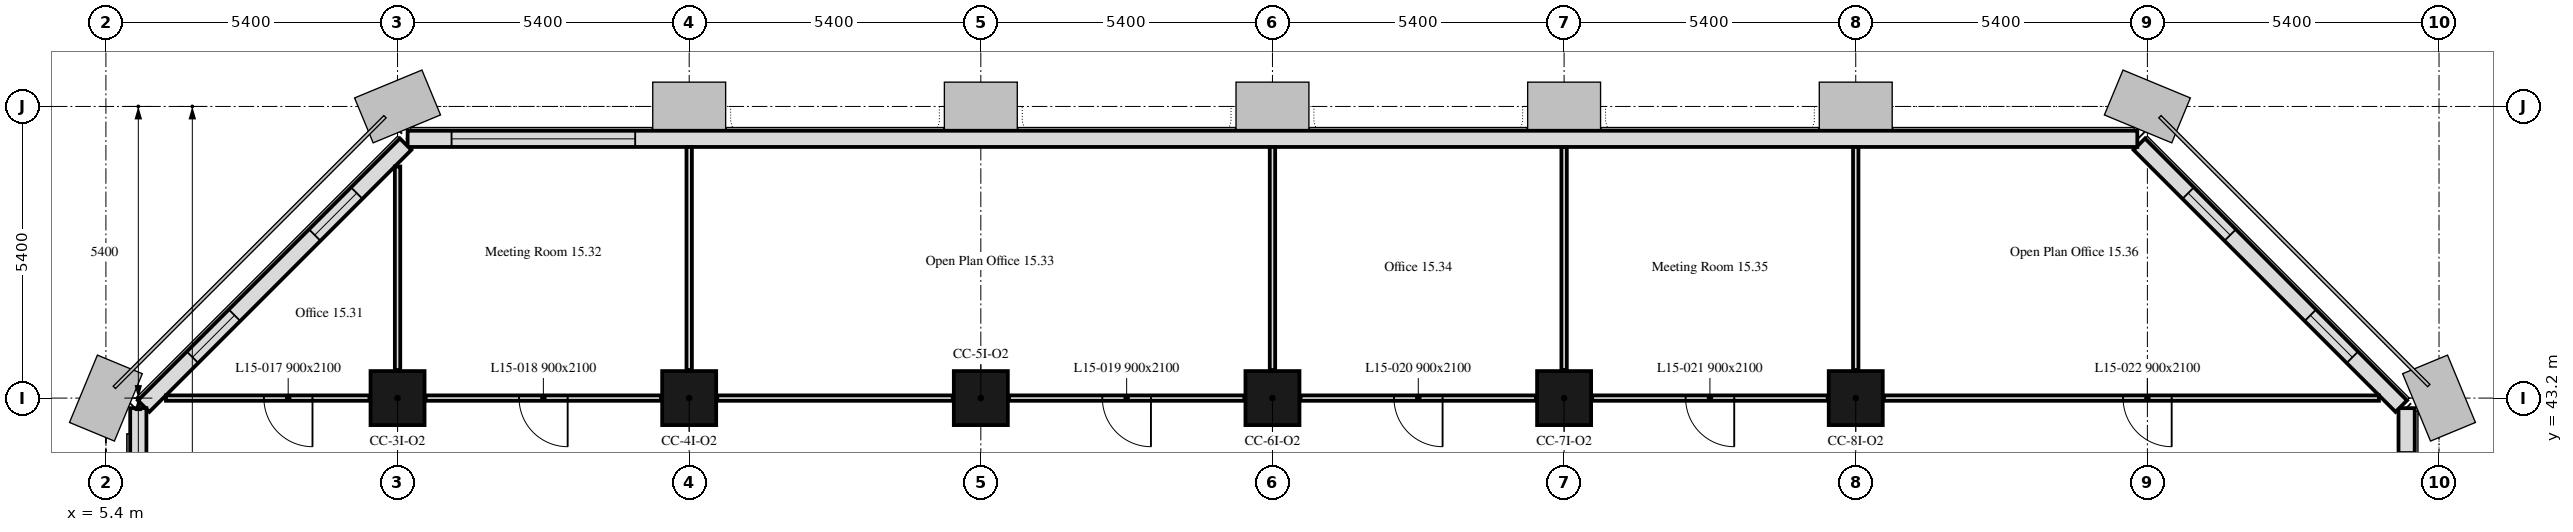
"""IFC4 building model, lengths in metres.
Left out: names, types, materials, properties, quantities, classifications, styles, units other than length and angle.
Written with IfcOpenShell. Run it as: python <this file> out.ifc"""

import sys

from ifc_helpers import new_model, si_unit, direction, frame, frame_2d, origin, origin_2d, place, context, subcontext, project, spatial, rectangle, extrude, element, fill, save


model = new_model("IFC4")
c1 = context("Model", 3, precision=1e-05, world=origin(), true_north=direction((0.0, 1.0)))
c2 = subcontext(c1, "Body", "Model", "MODEL_VIEW")
j1 = project(units=[si_unit("LENGTHUNIT", "METRE"), si_unit("PLANEANGLEUNIT", "RADIAN")], contexts=[c1])
p1 = place(None, origin())
s1 = spatial("IfcSite", under=j1, at=p1, CompositionType="ELEMENT")
p2 = place(p1, origin())
s2 = spatial("IfcBuilding", under=s1, at=p2, CompositionType="ELEMENT")
p3 = place(p2, frame((0.0, 0.0, 68.8)))
s3 = spatial("IfcBuildingStorey", under=s2, at=p3, CompositionType="ELEMENT", Elevation=68.8)
for number, where, z_axis, x_axis in (
    (1, (10.8, 43.2, 0.0), (0.0, 0.0, 1.0), (1.0, 0.0, 0.0)),
    (2, (16.2, 43.2, 0.0), (0.0, 0.0, 1.0), (1.0, 0.0, 0.0)),
    (3, (21.6, 43.2, 0.0), (0.0, 0.0, 1.0), (1.0, 0.0, 0.0)),
    (4, (27.0, 43.2, 0.0), (0.0, 0.0, 1.0), (1.0, 0.0, 0.0)),
    (5, (32.4, 43.2, 0.0), (0.0, 0.0, 1.0), (1.0, 0.0, 0.0)),
    (6, (37.8, 43.2, 0.0), (0.0, 0.0, 1.0), (1.0, 0.0, 0.0)),
):
    element("IfcColumn", number, at=place(p3, frame(where, z_axis=z_axis, x_axis=x_axis)), inside=s3, PredefinedType="COLUMN", context=c2, shape_type="SweptSolid", body=[
        extrude(rectangle(XDim=1.0, YDim=1.0, at=origin_2d()), origin(), (0.0, 0.0, 1.0), 3.5),
    ])
p4 = place(p3, frame((48.0, 10.986, 0.0), z_axis=(0.0, 0.0, 1.0), x_axis=(0.0, 1.0, 0.0)))
e7 = element("IfcWall", 7, at=p4, inside=s3, PredefinedType="SOLIDWALL", context=c2, shape_type="SweptSolid", body=[
    extrude(rectangle(XDim=32.027, YDim=0.3, at=frame_2d((16.014, 0.0))), origin(), (0.0, 0.0, 1.0), 3.5),
])
p5 = place(p4, frame((27.814, 0.0, 0.9)))
e8 = element("IfcOpeningElement", 8, at=p5, cuts=e7, PredefinedType="OPENING", context=c2, shape_type="SweptSolid", body=[
    extrude(rectangle(XDim=3.4, YDim=1.7, at=frame_2d((1.7, 0.85))), frame((0.0, 0.16, 0.0), z_axis=(0.0, -1.0, 0.0), x_axis=(1.0, 0.0, 0.0)), (0.0, 0.0, 1.0), 0.32),
])
p6 = place(p3, frame((47.901, 43.051, 0.0), z_axis=(0.0, 0.0, 1.0), x_axis=(-0.707106781187, 0.707106781187, 0.0)))
e9 = element("IfcWall", 9, at=p6, inside=s3, PredefinedType="SOLIDWALL", context=c2, shape_type="SweptSolid", body=[
    extrude(rectangle(XDim=6.86, YDim=0.3, at=frame_2d((3.43, 0.0))), origin(), (0.0, 0.0, 1.0), 3.5),
])
p7 = place(p6, frame((1.28, 0.0, 0.9)))
e10 = element("IfcOpeningElement", 10, at=p7, cuts=e9, PredefinedType="OPENING", context=c2, shape_type="SweptSolid", body=[
    extrude(rectangle(XDim=1.1, YDim=1.7, at=frame_2d((0.55, 0.85))), frame((0.0, 0.16, 0.0), z_axis=(0.0, -1.0, 0.0), x_axis=(1.0, 0.0, 0.0)), (0.0, 0.0, 1.0), 0.32),
])
p8 = place(p6, frame((4.48, 0.0, 0.9)))
e11 = element("IfcOpeningElement", 11, at=p8, cuts=e9, PredefinedType="OPENING", context=c2, shape_type="SweptSolid", body=[
    extrude(rectangle(XDim=1.1, YDim=1.7, at=frame_2d((0.55, 0.85))), frame((0.0, 0.16, 0.0), z_axis=(0.0, -1.0, 0.0), x_axis=(1.0, 0.0, 0.0)), (0.0, 0.0, 1.0), 0.32),
])
p9 = place(p3, frame((43.014, 48.0, 0.0), z_axis=(0.0, 0.0, 1.0), x_axis=(-1.0, 0.0, 0.0)))
e12 = element("IfcWall", 12, at=p9, inside=s3, PredefinedType="SOLIDWALL", context=c2, shape_type="SweptSolid", body=[
    extrude(rectangle(XDim=32.027, YDim=0.3, at=frame_2d((16.014, 0.0))), origin(), (0.0, 0.0, 1.0), 3.5),
])
p10 = place(p9, frame((27.814, 0.0, 0.9)))
e13 = element("IfcOpeningElement", 13, at=p10, cuts=e12, PredefinedType="OPENING", context=c2, shape_type="SweptSolid", body=[
    extrude(rectangle(XDim=3.4, YDim=1.7, at=frame_2d((1.7, 0.85))), frame((0.0, 0.16, 0.0), z_axis=(0.0, -1.0, 0.0), x_axis=(1.0, 0.0, 0.0)), (0.0, 0.0, 1.0), 0.32),
])
p11 = place(p3, frame((10.949, 47.901, 0.0), z_axis=(0.0, 0.0, 1.0), x_axis=(-0.707106781187, -0.707106781187, 0.0)))
e14 = element("IfcWall", 14, at=p11, inside=s3, PredefinedType="SOLIDWALL", context=c2, shape_type="SweptSolid", body=[
    extrude(rectangle(XDim=6.86, YDim=0.3, at=frame_2d((3.43, 0.0))), origin(), (0.0, 0.0, 1.0), 3.5),
])
p12 = place(p11, frame((1.28, 0.0, 0.9)))
e15 = element("IfcOpeningElement", 15, at=p12, cuts=e14, PredefinedType="OPENING", context=c2, shape_type="SweptSolid", body=[
    extrude(rectangle(XDim=1.1, YDim=1.7, at=frame_2d((0.55, 0.85))), frame((0.0, 0.16, 0.0), z_axis=(0.0, -1.0, 0.0), x_axis=(1.0, 0.0, 0.0)), (0.0, 0.0, 1.0), 0.32),
])
p13 = place(p11, frame((4.48, 0.0, 0.9)))
e16 = element("IfcOpeningElement", 16, at=p13, cuts=e14, PredefinedType="OPENING", context=c2, shape_type="SweptSolid", body=[
    extrude(rectangle(XDim=1.1, YDim=1.7, at=frame_2d((0.55, 0.85))), frame((0.0, 0.16, 0.0), z_axis=(0.0, -1.0, 0.0), x_axis=(1.0, 0.0, 0.0)), (0.0, 0.0, 1.0), 0.32),
])
p14 = place(p3, frame((6.0, 43.014, 0.0), z_axis=(0.0, 0.0, 1.0), x_axis=(0.0, -1.0, 0.0)))
e17 = element("IfcWall", 17, at=p14, inside=s3, PredefinedType="SOLIDWALL", context=c2, shape_type="SweptSolid", body=[
    extrude(rectangle(XDim=10.614, YDim=0.3, at=frame_2d((5.307, 0.0))), origin(), (0.0, 0.0, 1.0), 3.5),
])
p15 = place(p14, frame((6.564, 0.0, 0.9)))
e18 = element("IfcOpeningElement", 18, at=p15, cuts=e17, PredefinedType="OPENING", context=c2, shape_type="SweptSolid", body=[
    extrude(rectangle(XDim=1.1, YDim=1.7, at=frame_2d((0.55, 0.85))), frame((0.0, 0.16, 0.0), z_axis=(0.0, -1.0, 0.0), x_axis=(1.0, 0.0, 0.0)), (0.0, 0.0, 1.0), 0.32),
])
p16 = place(p14, frame((8.164, 0.0, 0.9)))
e19 = element("IfcOpeningElement", 19, at=p16, cuts=e17, PredefinedType="OPENING", context=c2, shape_type="SweptSolid", body=[
    extrude(rectangle(XDim=1.1, YDim=1.7, at=frame_2d((0.55, 0.85))), frame((0.0, 0.16, 0.0), z_axis=(0.0, -1.0, 0.0), x_axis=(1.0, 0.0, 0.0)), (0.0, 0.0, 1.0), 0.32),
])
p17 = place(p3, frame((47.488, 43.2, 0.0), z_axis=(0.0, 0.0, 1.0), x_axis=(-1.0, 0.0, 0.0)))
e20 = element("IfcWall", 20, at=p17, inside=s3, PredefinedType="PARTITIONING", context=c2, shape_type="SweptSolid", body=[
    extrude(rectangle(XDim=9.168, YDim=0.1, at=frame_2d((4.584, 0.0))), origin(), (0.0, 0.0, 1.0), 3.5),
])
p18 = place(p17, frame((3.838, 0.0, 0.0)))
e21 = element("IfcOpeningElement", 21, at=p18, cuts=e20, PredefinedType="OPENING", context=c2, shape_type="SweptSolid", body=[
    extrude(rectangle(XDim=0.9, YDim=2.1, at=frame_2d((0.45, 1.05))), frame((0.0, 0.05, 0.0), z_axis=(0.0, -1.0, 0.0), x_axis=(1.0, 0.0, 0.0)), (0.0, 0.0, 1.0), 0.1),
])
p19 = place(p3, frame((37.28, 43.2, 0.0), z_axis=(0.0, 0.0, 1.0), x_axis=(-1.0, 0.0, 0.0)))
e22 = element("IfcWall", 22, at=p19, inside=s3, PredefinedType="PARTITIONING", context=c2, shape_type="SweptSolid", body=[
    extrude(rectangle(XDim=4.36, YDim=0.1, at=frame_2d((2.18, 0.0))), origin(), (0.0, 0.0, 1.0), 3.5),
])
p20 = place(p19, frame((1.73, 0.0, 0.0)))
e23 = element("IfcOpeningElement", 23, at=p20, cuts=e22, PredefinedType="OPENING", context=c2, shape_type="SweptSolid", body=[
    extrude(rectangle(XDim=0.9, YDim=2.1, at=frame_2d((0.45, 1.05))), frame((0.0, 0.05, 0.0), z_axis=(0.0, -1.0, 0.0), x_axis=(1.0, 0.0, 0.0)), (0.0, 0.0, 1.0), 0.1),
])
p21 = place(p3, frame((31.88, 43.2, 0.0), z_axis=(0.0, 0.0, 1.0), x_axis=(-1.0, 0.0, 0.0)))
e24 = element("IfcWall", 24, at=p21, inside=s3, PredefinedType="PARTITIONING", context=c2, shape_type="SweptSolid", body=[
    extrude(rectangle(XDim=4.36, YDim=0.1, at=frame_2d((2.18, 0.0))), origin(), (0.0, 0.0, 1.0), 3.5),
])
p22 = place(p21, frame((1.73, 0.0, 0.0)))
e25 = element("IfcOpeningElement", 25, at=p22, cuts=e24, PredefinedType="OPENING", context=c2, shape_type="SweptSolid", body=[
    extrude(rectangle(XDim=0.9, YDim=2.1, at=frame_2d((0.45, 1.05))), frame((0.0, 0.05, 0.0), z_axis=(0.0, -1.0, 0.0), x_axis=(1.0, 0.0, 0.0)), (0.0, 0.0, 1.0), 0.1),
])
p23 = place(p3, frame((26.48, 43.2, 0.0), z_axis=(0.0, 0.0, 1.0), x_axis=(-1.0, 0.0, 0.0)))
e26 = element("IfcWall", 26, at=p23, inside=s3, PredefinedType="PARTITIONING", context=c2, shape_type="SweptSolid", body=[
    extrude(rectangle(XDim=4.36, YDim=0.1, at=frame_2d((2.18, 0.0))), origin(), (0.0, 0.0, 1.0), 3.5),
])
p24 = place(p23, frame((1.73, 0.0, 0.0)))
e27 = element("IfcOpeningElement", 27, at=p24, cuts=e26, PredefinedType="OPENING", context=c2, shape_type="SweptSolid", body=[
    extrude(rectangle(XDim=0.9, YDim=2.1, at=frame_2d((0.45, 1.05))), frame((0.0, 0.05, 0.0), z_axis=(0.0, -1.0, 0.0), x_axis=(1.0, 0.0, 0.0)), (0.0, 0.0, 1.0), 0.1),
])
p25 = place(p3, frame((21.08, 43.2, 0.0), z_axis=(0.0, 0.0, 1.0), x_axis=(-1.0, 0.0, 0.0)))
e28 = element("IfcWall", 28, at=p25, inside=s3, PredefinedType="PARTITIONING", context=c2, shape_type="SweptSolid", body=[
    extrude(rectangle(XDim=4.36, YDim=0.1, at=frame_2d((2.18, 0.0))), origin(), (0.0, 0.0, 1.0), 3.5),
])
p26 = place(p3, frame((15.68, 43.2, 0.0), z_axis=(0.0, 0.0, 1.0), x_axis=(-1.0, 0.0, 0.0)))
e29 = element("IfcWall", 29, at=p26, inside=s3, PredefinedType="PARTITIONING", context=c2, shape_type="SweptSolid", body=[
    extrude(rectangle(XDim=4.36, YDim=0.1, at=frame_2d((2.18, 0.0))), origin(), (0.0, 0.0, 1.0), 3.5),
])
p27 = place(p26, frame((1.73, 0.0, 0.0)))
e30 = element("IfcOpeningElement", 30, at=p27, cuts=e29, PredefinedType="OPENING", context=c2, shape_type="SweptSolid", body=[
    extrude(rectangle(XDim=0.9, YDim=2.1, at=frame_2d((0.45, 1.05))), frame((0.0, 0.05, 0.0), z_axis=(0.0, -1.0, 0.0), x_axis=(1.0, 0.0, 0.0)), (0.0, 0.0, 1.0), 0.1),
])
p28 = place(p3, frame((10.28, 43.2, 0.0), z_axis=(0.0, 0.0, 1.0), x_axis=(-1.0, 0.0, 0.0)))
e31 = element("IfcWall", 31, at=p28, inside=s3, PredefinedType="PARTITIONING", context=c2, shape_type="SweptSolid", body=[
    extrude(rectangle(XDim=3.768, YDim=0.1, at=frame_2d((1.884, 0.0))), origin(), (0.0, 0.0, 1.0), 3.5),
])
p29 = place(p28, frame((1.055, 0.0, 0.0)))
e32 = element("IfcOpeningElement", 32, at=p29, cuts=e31, PredefinedType="OPENING", context=c2, shape_type="SweptSolid", body=[
    extrude(rectangle(XDim=0.9, YDim=2.1, at=frame_2d((0.45, 1.05))), frame((0.0, 0.05, 0.0), z_axis=(0.0, -1.0, 0.0), x_axis=(1.0, 0.0, 0.0)), (0.0, 0.0, 1.0), 0.1),
])
p30 = place(p3, frame((10.8, 43.72, 0.0), z_axis=(0.0, 0.0, 1.0), x_axis=(0.0, 1.0, 0.0)))
e33 = element("IfcWall", 33, at=p30, inside=s3, PredefinedType="PARTITIONING", context=c2, shape_type="SweptSolid", body=[
    extrude(rectangle(XDim=3.768, YDim=0.1, at=frame_2d((1.884, 0.0))), origin(), (0.0, 0.0, 1.0), 3.5),
])
for number, where, z_axis, x_axis in (
    (34, (16.2, 43.72, 0.0), (0.0, 0.0, 1.0), (0.0, 1.0, 0.0)),
    (35, (27.0, 47.849, 0.0), (0.0, 0.0, 1.0), (0.0, -1.0, 0.0)),
    (36, (32.4, 47.849, 0.0), (0.0, 0.0, 1.0), (0.0, -1.0, 0.0)),
    (37, (37.8, 47.849, 0.0), (0.0, 0.0, 1.0), (0.0, -1.0, 0.0)),
):
    element("IfcWall", number, at=place(p3, frame(where, z_axis=z_axis, x_axis=x_axis)), inside=s3, PredefinedType="PARTITIONING", context=c2, shape_type="SweptSolid", body=[
        extrude(rectangle(XDim=4.129, YDim=0.1, at=frame_2d((2.064, 0.0))), origin(), (0.0, 0.0, 1.0), 2.75),
    ])
p31 = place(p7, origin())
e38 = element("IfcWindow", 38, at=p31, inside=s3, PartitioningType="SINGLE_PANEL", PredefinedType="WINDOW", context=c2, shape_type="SweptSolid", body=[
    extrude(rectangle(XDim=1.1, YDim=1.7, at=frame_2d((0.55, 0.85))), frame((0.0, 0.03, 0.0), z_axis=(0.0, -1.0, 0.0), x_axis=(1.0, 0.0, 0.0)), (0.0, 0.0, 1.0), 0.06),
])
fill(e10, e38)
p32 = place(p8, origin())
e39 = element("IfcWindow", 39, at=p32, inside=s3, PartitioningType="SINGLE_PANEL", PredefinedType="WINDOW", context=c2, shape_type="SweptSolid", body=[
    extrude(rectangle(XDim=1.1, YDim=1.7, at=frame_2d((0.55, 0.85))), frame((0.0, 0.03, 0.0), z_axis=(0.0, -1.0, 0.0), x_axis=(1.0, 0.0, 0.0)), (0.0, 0.0, 1.0), 0.06),
])
fill(e11, e39)
p33 = place(p10, origin())
e40 = element("IfcWindow", 40, at=p33, inside=s3, PartitioningType="SINGLE_PANEL", PredefinedType="WINDOW", context=c2, shape_type="SweptSolid", body=[
    extrude(rectangle(XDim=3.4, YDim=1.7, at=frame_2d((1.7, 0.85))), frame((0.0, 0.03, 0.0), z_axis=(0.0, -1.0, 0.0), x_axis=(1.0, 0.0, 0.0)), (0.0, 0.0, 1.0), 0.06),
])
fill(e13, e40)
p34 = place(p12, origin())
e41 = element("IfcWindow", 41, at=p34, inside=s3, PartitioningType="SINGLE_PANEL", PredefinedType="WINDOW", context=c2, shape_type="SweptSolid", body=[
    extrude(rectangle(XDim=1.1, YDim=1.7, at=frame_2d((0.55, 0.85))), frame((0.0, 0.03, 0.0), z_axis=(0.0, -1.0, 0.0), x_axis=(1.0, 0.0, 0.0)), (0.0, 0.0, 1.0), 0.06),
])
fill(e15, e41)
p35 = place(p13, origin())
e42 = element("IfcWindow", 42, at=p35, inside=s3, PartitioningType="SINGLE_PANEL", PredefinedType="WINDOW", context=c2, shape_type="SweptSolid", body=[
    extrude(rectangle(XDim=1.1, YDim=1.7, at=frame_2d((0.55, 0.85))), frame((0.0, 0.03, 0.0), z_axis=(0.0, -1.0, 0.0), x_axis=(1.0, 0.0, 0.0)), (0.0, 0.0, 1.0), 0.06),
])
fill(e16, e42)
p36 = place(p29, origin())
e43 = element("IfcDoor", 43, at=p36, inside=s3, OperationType="SINGLE_SWING_RIGHT", PredefinedType="DOOR", context=c2, shape_type="SweptSolid", body=[
    extrude(rectangle(XDim=0.9, YDim=2.1, at=frame_2d((0.45, 1.05))), frame((0.0, 0.025, 0.0), z_axis=(0.0, -1.0, 0.0), x_axis=(1.0, 0.0, 0.0)), (0.0, 0.0, 1.0), 0.05),
])
fill(e32, e43)
p37 = place(p27, origin())
e44 = element("IfcDoor", 44, at=p37, inside=s3, OperationType="SINGLE_SWING_RIGHT", PredefinedType="DOOR", context=c2, shape_type="SweptSolid", body=[
    extrude(rectangle(XDim=0.9, YDim=2.1, at=frame_2d((0.45, 1.05))), frame((0.0, 0.025, 0.0), z_axis=(0.0, -1.0, 0.0), x_axis=(1.0, 0.0, 0.0)), (0.0, 0.0, 1.0), 0.05),
])
fill(e30, e44)
p38 = place(p24, origin())
e45 = element("IfcDoor", 45, at=p38, inside=s3, OperationType="SINGLE_SWING_RIGHT", PredefinedType="DOOR", context=c2, shape_type="SweptSolid", body=[
    extrude(rectangle(XDim=0.9, YDim=2.1, at=frame_2d((0.45, 1.05))), frame((0.0, 0.025, 0.0), z_axis=(0.0, -1.0, 0.0), x_axis=(1.0, 0.0, 0.0)), (0.0, 0.0, 1.0), 0.05),
])
fill(e27, e45)
p39 = place(p22, origin())
e46 = element("IfcDoor", 46, at=p39, inside=s3, OperationType="SINGLE_SWING_RIGHT", PredefinedType="DOOR", context=c2, shape_type="SweptSolid", body=[
    extrude(rectangle(XDim=0.9, YDim=2.1, at=frame_2d((0.45, 1.05))), frame((0.0, 0.025, 0.0), z_axis=(0.0, -1.0, 0.0), x_axis=(1.0, 0.0, 0.0)), (0.0, 0.0, 1.0), 0.05),
])
fill(e25, e46)
p40 = place(p20, origin())
e47 = element("IfcDoor", 47, at=p40, inside=s3, OperationType="SINGLE_SWING_LEFT", PredefinedType="DOOR", context=c2, shape_type="SweptSolid", body=[
    extrude(rectangle(XDim=0.9, YDim=2.1, at=frame_2d((0.45, 1.05))), frame((0.0, 0.025, 0.0), z_axis=(0.0, -1.0, 0.0), x_axis=(1.0, 0.0, 0.0)), (0.0, 0.0, 1.0), 0.05),
])
fill(e23, e47)
p41 = place(p18, origin())
e48 = element("IfcDoor", 48, at=p41, inside=s3, OperationType="SINGLE_SWING_LEFT", PredefinedType="DOOR", context=c2, shape_type="SweptSolid", body=[
    extrude(rectangle(XDim=0.9, YDim=2.1, at=frame_2d((0.45, 1.05))), frame((0.0, 0.025, 0.0), z_axis=(0.0, -1.0, 0.0), x_axis=(1.0, 0.0, 0.0)), (0.0, 0.0, 1.0), 0.05),
])
fill(e21, e48)
save(model, sys.argv[1])
